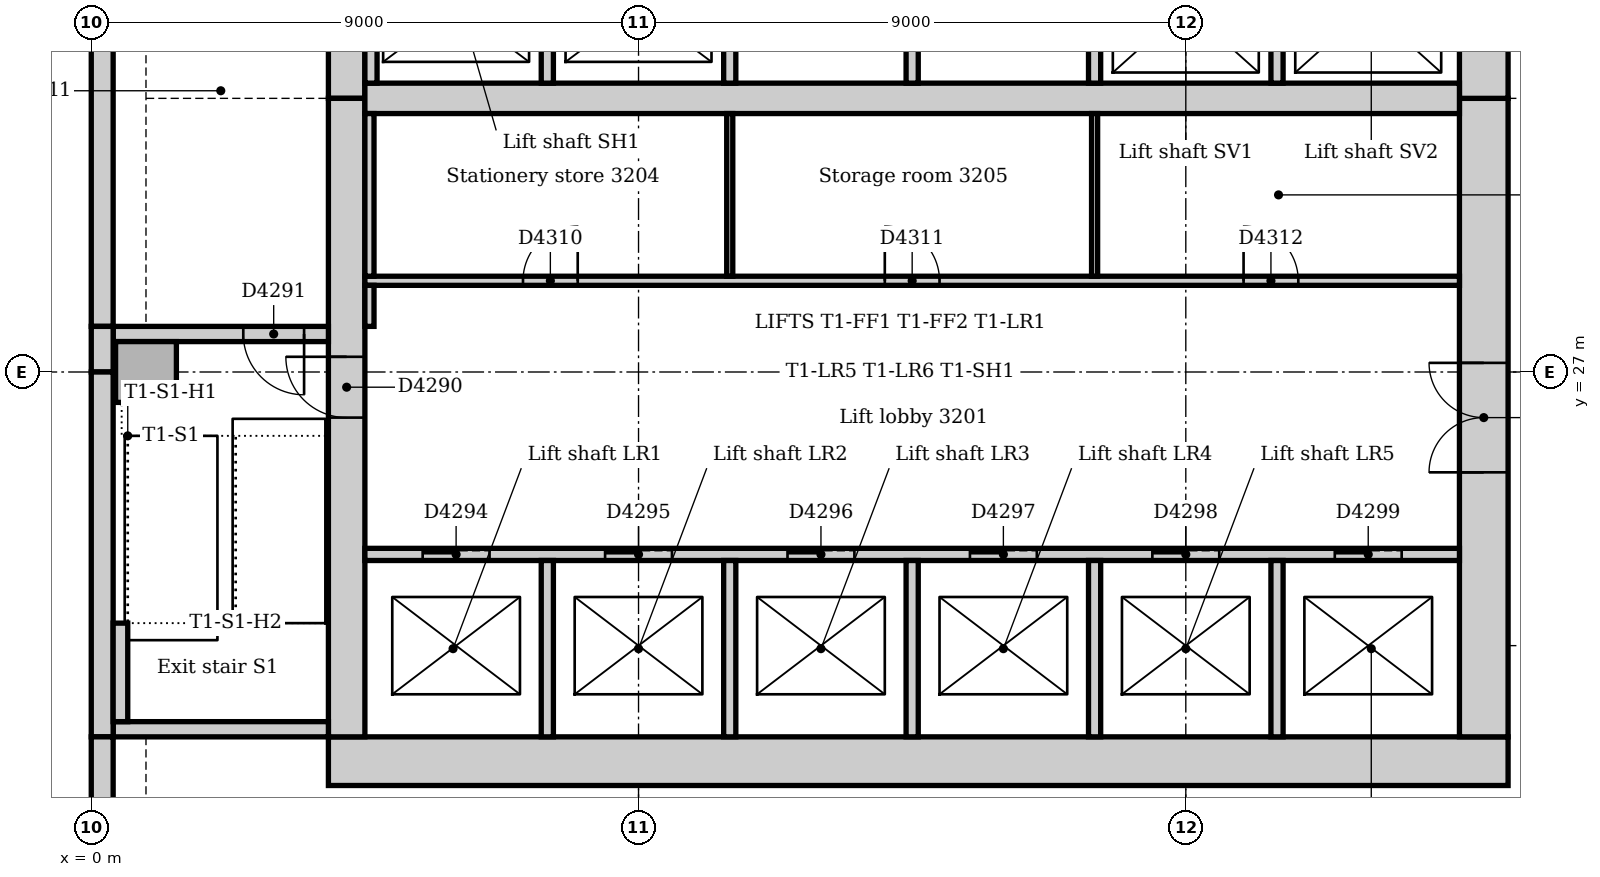
"""IFC4 building model, lengths in metres.
Left out: names, types, materials, properties, quantities, classifications, styles, units other than length and angle.
Written with IfcOpenShell. Run it as: python <this file> out.ifc"""

import sys

from ifc_helpers import new_model, si_unit, direction, frame, frame_2d, origin, origin_2d, place, context, subcontext, project, spatial, rectangle, extrude, element, fill, save


model = new_model("IFC4")
c1 = context("Model", 3, precision=1e-05, world=origin(), true_north=direction((0.0, 1.0)))
c2 = subcontext(c1, "Body", "Model", "MODEL_VIEW")
j1 = project(units=[si_unit("LENGTHUNIT", "METRE"), si_unit("PLANEANGLEUNIT", "RADIAN")], contexts=[c1])
p1 = place(None, origin())
s1 = spatial("IfcSite", under=j1, at=p1, CompositionType="ELEMENT")
p2 = place(p1, origin())
s2 = spatial("IfcBuilding", under=s1, at=p2, CompositionType="ELEMENT")
p3 = place(p2, frame((0.0, 0.0, 136.0)))
s3 = spatial("IfcBuildingStorey", under=s2, at=p3, CompositionType="ELEMENT", Elevation=136.0)
p4 = place(p3, frame((3.9, 20.6, 0.0), z_axis=(0.0, 0.0, 1.0), x_axis=(1.0, 0.0, 0.0)))
e1 = element("IfcWall", 1, at=p4, inside=s3, PredefinedType="SOLIDWALL", context=c2, shape_type="SweptSolid", body=[
    extrude(rectangle(XDim=19.4, YDim=0.8, at=frame_2d((9.7, 0.0))), origin(), (0.0, 0.0, 1.0), 4.0),
])
p5 = place(p3, frame((22.9, 21.0, 0.0), z_axis=(0.0, 0.0, 1.0), x_axis=(0.0, 1.0, 0.0)))
e2 = element("IfcWall", 2, at=p5, inside=s3, PredefinedType="SOLIDWALL", context=c2, shape_type="SweptSolid", body=[
    extrude(rectangle(XDim=10.5, YDim=0.8, at=frame_2d((5.25, 0.0))), origin(), (0.0, 0.0, 1.0), 4.0),
])
p6 = place(p5, frame((4.35, 0.0, 0.0)))
e3 = element("IfcOpeningElement", 3, at=p6, cuts=e2, PredefinedType="OPENING", context=c2, shape_type="SweptSolid", body=[
    extrude(rectangle(XDim=1.8, YDim=2.1, at=frame_2d((0.9, 1.05))), frame((0.0, 0.41, 0.0), z_axis=(0.0, -1.0, 0.0), x_axis=(1.0, 0.0, 0.0)), (0.0, 0.0, 1.0), 0.82),
])
p7 = place(p3, frame((22.9, 31.5, 0.0), z_axis=(0.0, 0.0, 1.0), x_axis=(0.0, 1.0, 0.0)))
e4 = element("IfcWall", 4, at=p7, inside=s3, PredefinedType="SOLIDWALL", context=c2, shape_type="SweptSolid", body=[
    extrude(rectangle(XDim=10.5, YDim=0.8, at=frame_2d((5.25, 0.0))), origin(), (0.0, 0.0, 1.0), 4.0),
])
p8 = place(p7, frame((3.15, 0.0, 0.0)))
e5 = element("IfcOpeningElement", 5, at=p8, cuts=e4, PredefinedType="OPENING", context=c2, shape_type="SweptSolid", body=[
    extrude(rectangle(XDim=1.0, YDim=2.1, at=frame_2d((0.5, 1.05))), frame((0.0, 0.41, 0.0), z_axis=(0.0, -1.0, 0.0), x_axis=(1.0, 0.0, 0.0)), (0.0, 0.0, 1.0), 0.82),
])
p9 = place(p7, frame((5.2, 0.0, 0.0)))
e6 = element("IfcOpeningElement", 6, at=p9, cuts=e4, PredefinedType="OPENING", context=c2, shape_type="SweptSolid", body=[
    extrude(rectangle(XDim=1.0, YDim=2.1, at=frame_2d((0.5, 1.05))), frame((0.0, 0.41, 0.0), z_axis=(0.0, -1.0, 0.0), x_axis=(1.0, 0.0, 0.0)), (0.0, 0.0, 1.0), 0.82),
])
p10 = place(p3, frame((4.2, 42.0, 0.0), z_axis=(0.0, 0.0, 1.0), x_axis=(0.0, -1.0, 0.0)))
e7 = element("IfcWall", 7, at=p10, inside=s3, PredefinedType="SOLIDWALL", context=c2, shape_type="SweptSolid", body=[
    extrude(rectangle(XDim=10.5, YDim=0.6, at=frame_2d((5.25, 0.0))), origin(), (0.0, 0.0, 1.0), 4.0),
])
p11 = place(p10, frame((5.3, 0.0, 0.0)))
e8 = element("IfcOpeningElement", 8, at=p11, cuts=e7, PredefinedType="OPENING", context=c2, shape_type="SweptSolid", body=[
    extrude(rectangle(XDim=1.0, YDim=2.1, at=frame_2d((0.5, 1.05))), frame((0.0, 0.31, 0.0), z_axis=(0.0, -1.0, 0.0), x_axis=(1.0, 0.0, 0.0)), (0.0, 0.0, 1.0), 0.62),
])
p12 = place(p3, frame((4.2, 31.5, 0.0), z_axis=(0.0, 0.0, 1.0), x_axis=(0.0, -1.0, 0.0)))
e9 = element("IfcWall", 9, at=p12, inside=s3, PredefinedType="SOLIDWALL", context=c2, shape_type="SweptSolid", body=[
    extrude(rectangle(XDim=10.5, YDim=0.6, at=frame_2d((5.25, 0.0))), origin(), (0.0, 0.0, 1.0), 4.0),
])
p13 = place(p12, frame((4.25, 0.0, 0.0)))
e10 = element("IfcOpeningElement", 10, at=p13, cuts=e9, PredefinedType="OPENING", context=c2, shape_type="SweptSolid", body=[
    extrude(rectangle(XDim=1.0, YDim=2.1, at=frame_2d((0.5, 1.05))), frame((0.0, 0.31, 0.0), z_axis=(0.0, -1.0, 0.0), x_axis=(1.0, 0.0, 0.0)), (0.0, 0.0, 1.0), 0.62),
])
p14 = place(p3, frame((4.5, 31.5, 0.0), z_axis=(0.0, 0.0, 1.0), x_axis=(1.0, 0.0, 0.0)))
e11 = element("IfcWall", 11, at=p14, inside=s3, PredefinedType="SOLIDWALL", context=c2, shape_type="SweptSolid", body=[
    extrude(rectangle(XDim=18.0, YDim=0.5, at=frame_2d((9.0, 0.0))), origin(), (0.0, 0.0, 1.0), 4.0),
])
p15 = place(p3, frame((0.36, 21.125, 0.0), z_axis=(0.0, 0.0, 1.0), x_axis=(1.0, 0.0, 0.0)))
e12 = element("IfcWall", 12, at=p15, inside=s3, PredefinedType="SOLIDWALL", context=c2, shape_type="SweptSolid", body=[
    extrude(rectangle(XDim=3.54, YDim=0.25, at=frame_2d((1.77, 0.0))), origin(), (0.0, 0.0, 1.0), 4.0),
])
p16 = place(p3, frame((3.9, 27.625, 0.0), z_axis=(0.0, 0.0, 1.0), x_axis=(-1.0, 0.0, 0.0)))
e13 = element("IfcWall", 13, at=p16, inside=s3, PredefinedType="SOLIDWALL", context=c2, shape_type="SweptSolid", body=[
    extrude(rectangle(XDim=3.54, YDim=0.25, at=frame_2d((1.77, 0.0))), origin(), (0.0, 0.0, 1.0), 4.0),
])
p17 = place(p16, frame((0.4, 0.0, 0.0)))
e14 = element("IfcOpeningElement", 14, at=p17, cuts=e13, PredefinedType="OPENING", context=c2, shape_type="SweptSolid", body=[
    extrude(rectangle(XDim=1.0, YDim=2.1, at=frame_2d((0.5, 1.05))), frame((0.0, 0.135, 0.0), z_axis=(0.0, -1.0, 0.0), x_axis=(1.0, 0.0, 0.0)), (0.0, 0.0, 1.0), 0.27),
])
p18 = place(p3, frame((0.9, 27.0, 0.0), z_axis=(0.0, 0.0, 1.0), x_axis=(1.0, 0.0, 0.0)))
e15 = element("IfcColumn", 15, at=p18, inside=s3, PredefinedType="COLUMN", context=c2, shape_type="SweptSolid", body=[
    extrude(rectangle(XDim=1.0, YDim=1.0, at=origin_2d()), origin(), (0.0, 0.0, 1.0), 4.0),
])
p19 = place(p3, frame((0.18, 35.25, 0.0), z_axis=(0.0, 0.0, 1.0), x_axis=(0.0, -1.0, 0.0)))
e16 = element("IfcWall", 16, at=p19, inside=s3, PredefinedType="STANDARD", context=c2, shape_type="SweptSolid", body=[
    extrude(rectangle(XDim=7.5, YDim=0.36, at=frame_2d((3.75, 0.0))), origin(), (0.0, 0.0, 1.0), 3.436),
])
p20 = place(p3, frame((0.18, 27.75, 0.0), z_axis=(0.0, 0.0, 1.0), x_axis=(0.0, -1.0, 0.0)))
e17 = element("IfcWall", 17, at=p20, inside=s3, PredefinedType="STANDARD", context=c2, shape_type="SweptSolid", body=[
    extrude(rectangle(XDim=0.75, YDim=0.36, at=frame_2d((0.375, 0.0))), origin(), (0.0, 0.0, 1.0), 3.436),
])
p21 = place(p3, frame((0.18, 27.0, 0.0), z_axis=(0.0, 0.0, 1.0), x_axis=(0.0, -1.0, 0.0)))
e18 = element("IfcWall", 18, at=p21, inside=s3, PredefinedType="STANDARD", context=c2, shape_type="SweptSolid", body=[
    extrude(rectangle(XDim=6.0, YDim=0.36, at=frame_2d((3.0, 0.0))), origin(), (0.0, 0.0, 1.0), 3.85),
])
p22 = place(p3, frame((0.18, 21.0, 0.0), z_axis=(0.0, 0.0, 1.0), x_axis=(0.0, -1.0, 0.0)))
e19 = element("IfcWall", 19, at=p22, inside=s3, PredefinedType="STANDARD", context=c2, shape_type="SweptSolid", body=[
    extrude(rectangle(XDim=12.257, YDim=0.36, at=frame_2d((6.129, 0.0))), origin(), (0.0, 0.0, 1.0), 3.85),
])
p23 = place(p22, frame((1.35, 0.0, 0.9)))
e20 = element("IfcOpeningElement", 20, at=p23, cuts=e19, PredefinedType="OPENING", context=c2, shape_type="SweptSolid", body=[
    extrude(rectangle(XDim=3.3, YDim=1.6, at=frame_2d((1.65, 0.8))), frame((0.0, 0.19, 0.0), z_axis=(0.0, -1.0, 0.0), x_axis=(1.0, 0.0, 0.0)), (0.0, 0.0, 1.0), 0.38),
])
p24 = place(p22, frame((5.85, 0.0, 0.9)))
e21 = element("IfcOpeningElement", 21, at=p24, cuts=e19, PredefinedType="OPENING", context=c2, shape_type="SweptSolid", body=[
    extrude(rectangle(XDim=3.3, YDim=1.6, at=frame_2d((1.65, 0.8))), frame((0.0, 0.19, 0.0), z_axis=(0.0, -1.0, 0.0), x_axis=(1.0, 0.0, 0.0)), (0.0, 0.0, 1.0), 0.38),
])
p25 = place(p3, frame((0.48, 21.25, 0.0), z_axis=(0.0, 0.0, 1.0), x_axis=(0.0, 1.0, 0.0)))
e22 = element("IfcWall", 22, at=p25, inside=s3, PredefinedType="STANDARD", context=c2, shape_type="SweptSolid", body=[
    extrude(rectangle(XDim=1.62, YDim=0.24, at=frame_2d((0.81, 0.0))), origin(), (0.0, 0.0, 1.0), 4.0),
])
p26 = place(p3, frame((4.5, 24.0, 0.0), z_axis=(0.0, 0.0, 1.0), x_axis=(1.0, 0.0, 0.0)))
e23 = element("IfcWall", 23, at=p26, inside=s3, PredefinedType="PARTITIONING", context=c2, shape_type="SweptSolid", body=[
    extrude(rectangle(XDim=18.0, YDim=0.2, at=frame_2d((9.0, 0.0))), origin(), (0.0, 0.0, 1.0), 3.85),
])
p27 = place(p26, frame((0.95, 0.0, 0.0)))
e24 = element("IfcOpeningElement", 24, at=p27, cuts=e23, PredefinedType="OPENING", context=c2, shape_type="SweptSolid", body=[
    extrude(rectangle(XDim=1.1, YDim=2.1, at=frame_2d((0.55, 1.05))), frame((0.0, 0.11, 0.0), z_axis=(0.0, -1.0, 0.0), x_axis=(1.0, 0.0, 0.0)), (0.0, 0.0, 1.0), 0.22),
])
p28 = place(p26, frame((3.95, 0.0, 0.0)))
e25 = element("IfcOpeningElement", 25, at=p28, cuts=e23, PredefinedType="OPENING", context=c2, shape_type="SweptSolid", body=[
    extrude(rectangle(XDim=1.1, YDim=2.1, at=frame_2d((0.55, 1.05))), frame((0.0, 0.11, 0.0), z_axis=(0.0, -1.0, 0.0), x_axis=(1.0, 0.0, 0.0)), (0.0, 0.0, 1.0), 0.22),
])
p29 = place(p26, frame((6.95, 0.0, 0.0)))
e26 = element("IfcOpeningElement", 26, at=p29, cuts=e23, PredefinedType="OPENING", context=c2, shape_type="SweptSolid", body=[
    extrude(rectangle(XDim=1.1, YDim=2.1, at=frame_2d((0.55, 1.05))), frame((0.0, 0.11, 0.0), z_axis=(0.0, -1.0, 0.0), x_axis=(1.0, 0.0, 0.0)), (0.0, 0.0, 1.0), 0.22),
])
p30 = place(p26, frame((9.95, 0.0, 0.0)))
e27 = element("IfcOpeningElement", 27, at=p30, cuts=e23, PredefinedType="OPENING", context=c2, shape_type="SweptSolid", body=[
    extrude(rectangle(XDim=1.1, YDim=2.1, at=frame_2d((0.55, 1.05))), frame((0.0, 0.11, 0.0), z_axis=(0.0, -1.0, 0.0), x_axis=(1.0, 0.0, 0.0)), (0.0, 0.0, 1.0), 0.22),
])
p31 = place(p26, frame((12.95, 0.0, 0.0)))
e28 = element("IfcOpeningElement", 28, at=p31, cuts=e23, PredefinedType="OPENING", context=c2, shape_type="SweptSolid", body=[
    extrude(rectangle(XDim=1.1, YDim=2.1, at=frame_2d((0.55, 1.05))), frame((0.0, 0.11, 0.0), z_axis=(0.0, -1.0, 0.0), x_axis=(1.0, 0.0, 0.0)), (0.0, 0.0, 1.0), 0.22),
])
p32 = place(p26, frame((15.95, 0.0, 0.0)))
e29 = element("IfcOpeningElement", 29, at=p32, cuts=e23, PredefinedType="OPENING", context=c2, shape_type="SweptSolid", body=[
    extrude(rectangle(XDim=1.1, YDim=2.1, at=frame_2d((0.55, 1.05))), frame((0.0, 0.11, 0.0), z_axis=(0.0, -1.0, 0.0), x_axis=(1.0, 0.0, 0.0)), (0.0, 0.0, 1.0), 0.22),
])
p33 = place(p3, frame((4.6, 31.75, 0.0), z_axis=(0.0, 0.0, 1.0), x_axis=(0.0, 1.0, 0.0)))
e30 = element("IfcWall", 30, at=p33, inside=s3, PredefinedType="PARTITIONING", context=c2, shape_type="SweptSolid", body=[
    extrude(rectangle(XDim=2.65, YDim=0.2, at=frame_2d((1.325, 0.0))), origin(), (0.0, 0.0, 1.0), 3.85),
])
p34 = place(p3, frame((7.5, 21.0, 0.0), z_axis=(0.0, 0.0, 1.0), x_axis=(0.0, 1.0, 0.0)))
e31 = element("IfcWall", 31, at=p34, inside=s3, PredefinedType="PARTITIONING", context=c2, shape_type="SweptSolid", body=[
    extrude(rectangle(XDim=2.9, YDim=0.2, at=frame_2d((1.45, 0.0))), origin(), (0.0, 0.0, 1.0), 3.85),
])
p35 = place(p3, frame((7.5, 31.75, 0.0), z_axis=(0.0, 0.0, 1.0), x_axis=(0.0, 1.0, 0.0)))
e32 = element("IfcWall", 32, at=p35, inside=s3, PredefinedType="PARTITIONING", context=c2, shape_type="SweptSolid", body=[
    extrude(rectangle(XDim=2.65, YDim=0.2, at=frame_2d((1.325, 0.0))), origin(), (0.0, 0.0, 1.0), 3.85),
])
p36 = place(p3, frame((10.5, 21.0, 0.0), z_axis=(0.0, 0.0, 1.0), x_axis=(0.0, 1.0, 0.0)))
e33 = element("IfcWall", 33, at=p36, inside=s3, PredefinedType="PARTITIONING", context=c2, shape_type="SweptSolid", body=[
    extrude(rectangle(XDim=2.9, YDim=0.2, at=frame_2d((1.45, 0.0))), origin(), (0.0, 0.0, 1.0), 3.85),
])
p37 = place(p3, frame((10.5, 31.75, 0.0), z_axis=(0.0, 0.0, 1.0), x_axis=(0.0, 1.0, 0.0)))
e34 = element("IfcWall", 34, at=p37, inside=s3, PredefinedType="PARTITIONING", context=c2, shape_type="SweptSolid", body=[
    extrude(rectangle(XDim=2.65, YDim=0.2, at=frame_2d((1.325, 0.0))), origin(), (0.0, 0.0, 1.0), 3.85),
])
p38 = place(p3, frame((13.5, 21.0, 0.0), z_axis=(0.0, 0.0, 1.0), x_axis=(0.0, 1.0, 0.0)))
e35 = element("IfcWall", 35, at=p38, inside=s3, PredefinedType="PARTITIONING", context=c2, shape_type="SweptSolid", body=[
    extrude(rectangle(XDim=2.9, YDim=0.2, at=frame_2d((1.45, 0.0))), origin(), (0.0, 0.0, 1.0), 3.85),
])
p39 = place(p3, frame((13.5, 31.75, 0.0), z_axis=(0.0, 0.0, 1.0), x_axis=(0.0, 1.0, 0.0)))
e36 = element("IfcWall", 36, at=p39, inside=s3, PredefinedType="PARTITIONING", context=c2, shape_type="SweptSolid", body=[
    extrude(rectangle(XDim=2.65, YDim=0.2, at=frame_2d((1.325, 0.0))), origin(), (0.0, 0.0, 1.0), 3.85),
])
p40 = place(p3, frame((16.5, 21.0, 0.0), z_axis=(0.0, 0.0, 1.0), x_axis=(0.0, 1.0, 0.0)))
e37 = element("IfcWall", 37, at=p40, inside=s3, PredefinedType="PARTITIONING", context=c2, shape_type="SweptSolid", body=[
    extrude(rectangle(XDim=2.9, YDim=0.2, at=frame_2d((1.45, 0.0))), origin(), (0.0, 0.0, 1.0), 3.85),
])
p41 = place(p3, frame((16.5, 31.75, 0.0), z_axis=(0.0, 0.0, 1.0), x_axis=(0.0, 1.0, 0.0)))
e38 = element("IfcWall", 38, at=p41, inside=s3, PredefinedType="PARTITIONING", context=c2, shape_type="SweptSolid", body=[
    extrude(rectangle(XDim=2.65, YDim=0.2, at=frame_2d((1.325, 0.0))), origin(), (0.0, 0.0, 1.0), 3.85),
])
p42 = place(p3, frame((19.5, 21.0, 0.0), z_axis=(0.0, 0.0, 1.0), x_axis=(0.0, 1.0, 0.0)))
e39 = element("IfcWall", 39, at=p42, inside=s3, PredefinedType="PARTITIONING", context=c2, shape_type="SweptSolid", body=[
    extrude(rectangle(XDim=2.9, YDim=0.2, at=frame_2d((1.45, 0.0))), origin(), (0.0, 0.0, 1.0), 3.85),
])
p43 = place(p3, frame((19.5, 31.75, 0.0), z_axis=(0.0, 0.0, 1.0), x_axis=(0.0, 1.0, 0.0)))
e40 = element("IfcWall", 40, at=p43, inside=s3, PredefinedType="PARTITIONING", context=c2, shape_type="SweptSolid", body=[
    extrude(rectangle(XDim=2.65, YDim=0.2, at=frame_2d((1.325, 0.0))), origin(), (0.0, 0.0, 1.0), 3.85),
])
p44 = place(p3, frame((4.5, 28.5, 0.0), z_axis=(0.0, 0.0, 1.0), x_axis=(1.0, 0.0, 0.0)))
e41 = element("IfcWall", 41, at=p44, inside=s3, PredefinedType="PARTITIONING", context=c2, shape_type="SweptSolid", body=[
    extrude(rectangle(XDim=18.0, YDim=0.15, at=frame_2d((9.0, 0.0))), origin(), (0.0, 0.0, 1.0), 3.85),
])
p45 = place(p44, frame((2.6, 0.0, 0.0)))
e42 = element("IfcOpeningElement", 42, at=p45, cuts=e41, PredefinedType="OPENING", context=c2, shape_type="SweptSolid", body=[
    extrude(rectangle(XDim=0.9, YDim=2.1, at=frame_2d((0.45, 1.05))), frame((0.0, 0.085, 0.0), z_axis=(0.0, -1.0, 0.0), x_axis=(1.0, 0.0, 0.0)), (0.0, 0.0, 1.0), 0.17),
])
p46 = place(p44, frame((8.55, 0.0, 0.0)))
e43 = element("IfcOpeningElement", 43, at=p46, cuts=e41, PredefinedType="OPENING", context=c2, shape_type="SweptSolid", body=[
    extrude(rectangle(XDim=0.9, YDim=2.1, at=frame_2d((0.45, 1.05))), frame((0.0, 0.085, 0.0), z_axis=(0.0, -1.0, 0.0), x_axis=(1.0, 0.0, 0.0)), (0.0, 0.0, 1.0), 0.17),
])
p47 = place(p44, frame((14.45, 0.0, 0.0)))
e44 = element("IfcOpeningElement", 44, at=p47, cuts=e41, PredefinedType="OPENING", context=c2, shape_type="SweptSolid", body=[
    extrude(rectangle(XDim=0.9, YDim=2.1, at=frame_2d((0.45, 1.05))), frame((0.0, 0.085, 0.0), z_axis=(0.0, -1.0, 0.0), x_axis=(1.0, 0.0, 0.0)), (0.0, 0.0, 1.0), 0.17),
])
p48 = place(p3, frame((4.575, 27.75, 0.0), z_axis=(0.0, 0.0, 1.0), x_axis=(0.0, 1.0, 0.0)))
e45 = element("IfcWall", 45, at=p48, inside=s3, PredefinedType="PARTITIONING", context=c2, shape_type="SweptSolid", body=[
    extrude(rectangle(XDim=0.675, YDim=0.15, at=frame_2d((0.338, 0.0))), origin(), (0.0, 0.0, 1.0), 3.85),
])
p49 = place(p3, frame((4.575, 28.575, 0.0), z_axis=(0.0, 0.0, 1.0), x_axis=(0.0, 1.0, 0.0)))
e46 = element("IfcWall", 46, at=p49, inside=s3, PredefinedType="PARTITIONING", context=c2, shape_type="SweptSolid", body=[
    extrude(rectangle(XDim=2.675, YDim=0.15, at=frame_2d((1.337, 0.0))), origin(), (0.0, 0.0, 1.0), 3.85),
])
for number, where, z_axis, x_axis in (
    (47, (10.5, 28.575, 0.0), (0.0, 0.0, 1.0), (0.0, 1.0, 0.0)),
    (48, (16.5, 28.575, 0.0), (0.0, 0.0, 1.0), (0.0, 1.0, 0.0)),
):
    element("IfcWall", number, at=place(p3, frame(where, z_axis=z_axis, x_axis=x_axis)), inside=s3, PredefinedType="PARTITIONING", context=c2, shape_type="SweptSolid", body=[
        extrude(rectangle(XDim=2.675, YDim=0.1, at=frame_2d((1.337, 0.0))), origin(), (0.0, 0.0, 1.0), 3.85),
    ])
p50 = place(p13, frame((1.0, 0.0, 0.0), z_axis=(0.0, 0.0, 1.0), x_axis=(-1.0, 0.0, 0.0)))
e49 = element("IfcDoor", 49, at=p50, inside=s3, OperationType="SINGLE_SWING_RIGHT", PredefinedType="DOOR", context=c2, shape_type="SweptSolid", body=[
    extrude(rectangle(XDim=1.0, YDim=2.1, at=frame_2d((0.5, 1.05))), frame((0.0, 0.025, 0.0), z_axis=(0.0, -1.0, 0.0), x_axis=(1.0, 0.0, 0.0)), (0.0, 0.0, 1.0), 0.05),
])
fill(e10, e49)
p51 = place(p17, origin())
e50 = element("IfcDoor", 50, at=p51, inside=s3, OperationType="SINGLE_SWING_LEFT", PredefinedType="DOOR", context=c2, shape_type="SweptSolid", body=[
    extrude(rectangle(XDim=1.0, YDim=2.1, at=frame_2d((0.5, 1.05))), frame((0.0, 0.025, 0.0), z_axis=(0.0, -1.0, 0.0), x_axis=(1.0, 0.0, 0.0)), (0.0, 0.0, 1.0), 0.05),
])
fill(e14, e50)
p52 = place(p27, origin())
e51 = element("IfcDoor", 51, at=p52, inside=s3, OperationType="SLIDING_TO_LEFT", PredefinedType="DOOR", context=c2, shape_type="SweptSolid", body=[
    extrude(rectangle(XDim=1.1, YDim=2.1, at=frame_2d((0.55, 1.05))), frame((0.0, 0.025, 0.0), z_axis=(0.0, -1.0, 0.0), x_axis=(1.0, 0.0, 0.0)), (0.0, 0.0, 1.0), 0.05),
])
fill(e24, e51)
p53 = place(p28, origin())
e52 = element("IfcDoor", 52, at=p53, inside=s3, OperationType="SLIDING_TO_LEFT", PredefinedType="DOOR", context=c2, shape_type="SweptSolid", body=[
    extrude(rectangle(XDim=1.1, YDim=2.1, at=frame_2d((0.55, 1.05))), frame((0.0, 0.025, 0.0), z_axis=(0.0, -1.0, 0.0), x_axis=(1.0, 0.0, 0.0)), (0.0, 0.0, 1.0), 0.05),
])
fill(e25, e52)
p54 = place(p29, origin())
e53 = element("IfcDoor", 53, at=p54, inside=s3, OperationType="SLIDING_TO_LEFT", PredefinedType="DOOR", context=c2, shape_type="SweptSolid", body=[
    extrude(rectangle(XDim=1.1, YDim=2.1, at=frame_2d((0.55, 1.05))), frame((0.0, 0.025, 0.0), z_axis=(0.0, -1.0, 0.0), x_axis=(1.0, 0.0, 0.0)), (0.0, 0.0, 1.0), 0.05),
])
fill(e26, e53)
p55 = place(p30, origin())
e54 = element("IfcDoor", 54, at=p55, inside=s3, OperationType="SLIDING_TO_LEFT", PredefinedType="DOOR", context=c2, shape_type="SweptSolid", body=[
    extrude(rectangle(XDim=1.1, YDim=2.1, at=frame_2d((0.55, 1.05))), frame((0.0, 0.025, 0.0), z_axis=(0.0, -1.0, 0.0), x_axis=(1.0, 0.0, 0.0)), (0.0, 0.0, 1.0), 0.05),
])
fill(e27, e54)
p56 = place(p31, origin())
e55 = element("IfcDoor", 55, at=p56, inside=s3, OperationType="SLIDING_TO_LEFT", PredefinedType="DOOR", context=c2, shape_type="SweptSolid", body=[
    extrude(rectangle(XDim=1.1, YDim=2.1, at=frame_2d((0.55, 1.05))), frame((0.0, 0.025, 0.0), z_axis=(0.0, -1.0, 0.0), x_axis=(1.0, 0.0, 0.0)), (0.0, 0.0, 1.0), 0.05),
])
fill(e28, e55)
p57 = place(p32, origin())
e56 = element("IfcDoor", 56, at=p57, inside=s3, OperationType="SLIDING_TO_LEFT", PredefinedType="DOOR", context=c2, shape_type="SweptSolid", body=[
    extrude(rectangle(XDim=1.1, YDim=2.1, at=frame_2d((0.55, 1.05))), frame((0.0, 0.025, 0.0), z_axis=(0.0, -1.0, 0.0), x_axis=(1.0, 0.0, 0.0)), (0.0, 0.0, 1.0), 0.05),
])
fill(e29, e56)
p58 = place(p6, origin())
e57 = element("IfcDoor", 57, at=p58, inside=s3, OperationType="DOUBLE_DOOR_DOUBLE_SWING", PredefinedType="DOOR", context=c2, shape_type="SweptSolid", body=[
    extrude(rectangle(XDim=1.8, YDim=2.1, at=frame_2d((0.9, 1.05))), frame((0.0, 0.025, 0.0), z_axis=(0.0, -1.0, 0.0), x_axis=(1.0, 0.0, 0.0)), (0.0, 0.0, 1.0), 0.05),
])
fill(e3, e57)
p59 = place(p45, origin())
e58 = element("IfcDoor", 58, at=p59, inside=s3, OperationType="SINGLE_SWING_RIGHT", PredefinedType="DOOR", context=c2, shape_type="SweptSolid", body=[
    extrude(rectangle(XDim=0.9, YDim=2.1, at=frame_2d((0.45, 1.05))), frame((0.0, 0.025, 0.0), z_axis=(0.0, -1.0, 0.0), x_axis=(1.0, 0.0, 0.0)), (0.0, 0.0, 1.0), 0.05),
])
fill(e42, e58)
p60 = place(p46, origin())
e59 = element("IfcDoor", 59, at=p60, inside=s3, OperationType="SINGLE_SWING_LEFT", PredefinedType="DOOR", context=c2, shape_type="SweptSolid", body=[
    extrude(rectangle(XDim=0.9, YDim=2.1, at=frame_2d((0.45, 1.05))), frame((0.0, 0.025, 0.0), z_axis=(0.0, -1.0, 0.0), x_axis=(1.0, 0.0, 0.0)), (0.0, 0.0, 1.0), 0.05),
])
fill(e43, e59)
p61 = place(p47, origin())
e60 = element("IfcDoor", 60, at=p61, inside=s3, OperationType="SINGLE_SWING_LEFT", PredefinedType="DOOR", context=c2, shape_type="SweptSolid", body=[
    extrude(rectangle(XDim=0.9, YDim=2.1, at=frame_2d((0.45, 1.05))), frame((0.0, 0.025, 0.0), z_axis=(0.0, -1.0, 0.0), x_axis=(1.0, 0.0, 0.0)), (0.0, 0.0, 1.0), 0.05),
])
fill(e44, e60)
save(model, sys.argv[1])
